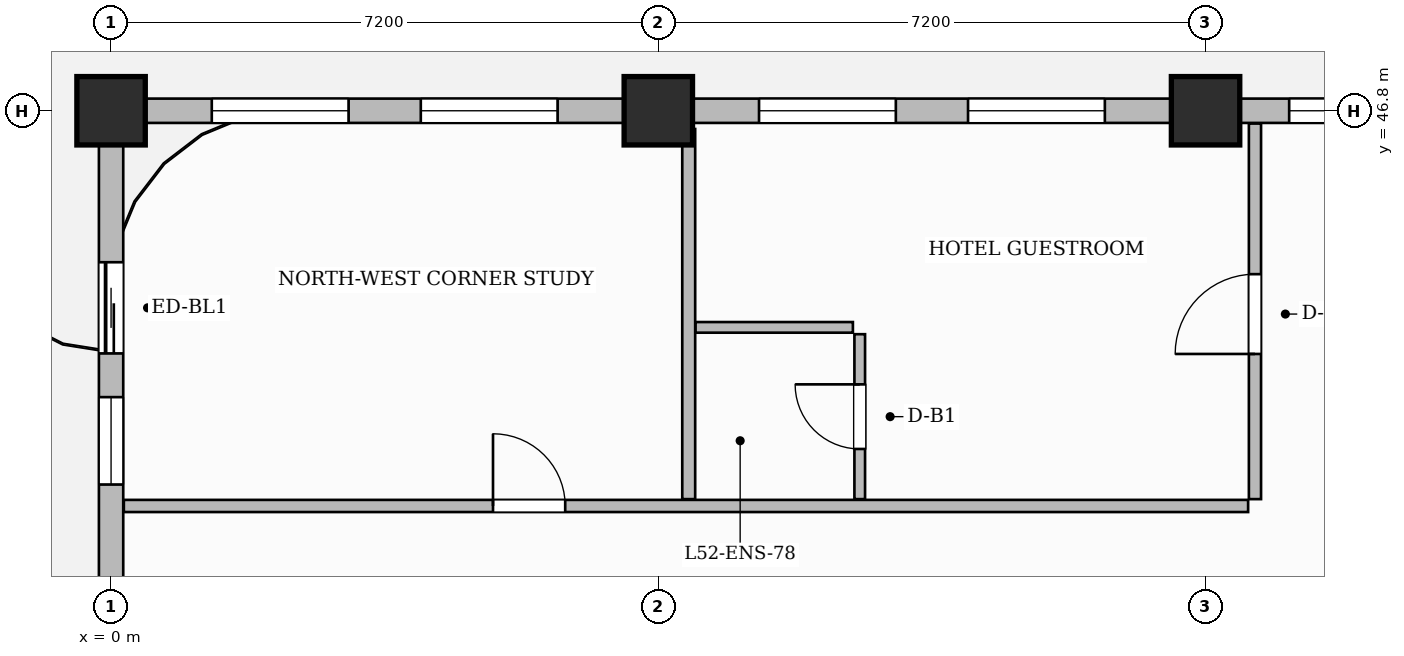
"""IFC4 building model, lengths in metres.
Left out: names, types, materials, properties, quantities, classifications, styles, units other than length and angle.
Written with IfcOpenShell. Run it as: python <this file> out.ifc"""

import sys

from ifc_helpers import new_model, si_unit, direction, frame, frame_2d, origin, origin_2d, place, context, subcontext, project, spatial, rectangle, extrude, source, transform, mapped, element, fill, save


model = new_model("IFC4")
c1 = context("Model", 3, precision=1e-05, world=origin(), true_north=direction((0.0, 1.0)))
c2 = subcontext(c1, "Body", "Model", "MODEL_VIEW")
j1 = project(units=[si_unit("LENGTHUNIT", "METRE"), si_unit("PLANEANGLEUNIT", "RADIAN")], contexts=[c1])
p1 = place(None, origin())
s1 = spatial("IfcSite", under=j1, at=p1, CompositionType="ELEMENT")
p2 = place(p1, origin())
s2 = spatial("IfcBuilding", under=s1, at=p2, CompositionType="ELEMENT")
p3 = place(p2, frame((0.0, 0.0, 209.6)))
s3 = spatial("IfcBuildingStorey", under=s2, at=p3, CompositionType="ELEMENT", Elevation=209.6)
m1 = source(origin(), c2, "Body", "SweptSolid", [
    extrude(rectangle(XDim=0.9, YDim=0.9, at=origin_2d()), origin(), (0.0, 0.0, 1.0), 3.85),
])
for number, where, z_axis, x_axis in (
    (1, (0.0, 46.8, 0.0), (0.0, 0.0, 1.0), (1.0, 0.0, 0.0)),
    (2, (7.2, 46.8, 0.0), (0.0, 0.0, 1.0), (1.0, 0.0, 0.0)),
    (3, (14.4, 46.8, 0.0), (0.0, 0.0, 1.0), (1.0, 0.0, 0.0)),
):
    element("IfcColumn", number, at=place(p3, frame(where, z_axis=z_axis, x_axis=x_axis)), inside=s3, PredefinedType="COLUMN", context=c2, shape_type="MappedRepresentation", body=[
        mapped(m1, transform((0.0, 0.0, 0.0), scale=1.0)),
    ])
p4 = place(p3, frame((15.05, 41.69, 0.0), z_axis=(0.0, 0.0, 1.0), x_axis=(0.0, 1.0, 0.0)))
e4 = element("IfcWall", 4, at=p4, inside=s3, PredefinedType="PARTITIONING", context=c2, shape_type="SweptSolid", body=[
    extrude(rectangle(XDim=4.942, YDim=0.16, at=frame_2d((2.471, 0.0))), origin(), (0.0, 0.0, 1.0), 3.6),
])
p5 = place(p4, frame((1.91, 0.0, 0.0)))
e5 = element("IfcOpeningElement", 5, at=p5, cuts=e4, PredefinedType="OPENING", context=c2, shape_type="SweptSolid", body=[
    extrude(rectangle(XDim=1.05, YDim=2.25, at=frame_2d((0.525, 1.125))), frame((0.0, 0.09, 0.0), z_axis=(0.0, -1.0, 0.0), x_axis=(1.0, 0.0, 0.0)), (0.0, 0.0, 1.0), 0.18),
])
p6 = place(p3, frame((7.6, 41.69, 0.0), z_axis=(0.0, 0.0, 1.0), x_axis=(0.0, 1.0, 0.0)))
e6 = element("IfcWall", 6, at=p6, inside=s3, PredefinedType="PARTITIONING", context=c2, shape_type="SweptSolid", body=[
    extrude(rectangle(XDim=4.87, YDim=0.17, at=frame_2d((2.435, 0.0))), origin(), (0.0, 0.0, 1.0), 3.6),
])
p7 = place(p3, frame((0.168, 41.6, 0.0), z_axis=(0.0, 0.0, 1.0), x_axis=(1.0, 0.0, 0.0)))
e7 = element("IfcWall", 7, at=p7, inside=s3, PredefinedType="PARTITIONING", context=c2, shape_type="SweptSolid", body=[
    extrude(rectangle(XDim=14.792, YDim=0.16, at=frame_2d((7.396, 0.0))), origin(), (0.0, 0.0, 1.0), 3.6),
])
p8 = place(p7, frame((4.857, 0.0, 0.0)))
e8 = element("IfcOpeningElement", 8, at=p8, cuts=e7, PredefinedType="OPENING", context=c2, shape_type="SweptSolid", body=[
    extrude(rectangle(XDim=0.95, YDim=2.15, at=frame_2d((0.475, 1.075))), frame((0.0, 0.09, 0.0), z_axis=(0.0, -1.0, 0.0), x_axis=(1.0, 0.0, 0.0)), (0.0, 0.0, 1.0), 0.18),
])
p9 = place(p3, frame((7.69, 43.95, 0.0), z_axis=(0.0, 0.0, 1.0), x_axis=(1.0, 0.0, 0.0)))
e9 = element("IfcWall", 9, at=p9, inside=s3, PredefinedType="PARTITIONING", context=c2, shape_type="SweptSolid", body=[
    extrude(rectangle(XDim=2.07, YDim=0.14, at=frame_2d((1.035, 0.0))), origin(), (0.0, 0.0, 1.0), 3.6),
])
p10 = place(p3, frame((9.85, 41.69, 0.0), z_axis=(0.0, 0.0, 1.0), x_axis=(0.0, 1.0, 0.0)))
e10 = element("IfcWall", 10, at=p10, inside=s3, PredefinedType="PARTITIONING", context=c2, shape_type="SweptSolid", body=[
    extrude(rectangle(XDim=2.17, YDim=0.14, at=frame_2d((1.085, 0.0))), origin(), (0.0, 0.0, 1.0), 3.6),
])
p11 = place(p10, frame((0.66, 0.0, 0.0)))
e11 = element("IfcOpeningElement", 11, at=p11, cuts=e10, PredefinedType="OPENING", context=c2, shape_type="SweptSolid", body=[
    extrude(rectangle(XDim=0.85, YDim=2.1, at=frame_2d((0.425, 1.05))), frame((0.0, 0.08, 0.0), z_axis=(0.0, -1.0, 0.0), x_axis=(1.0, 0.0, 0.0)), (0.0, 0.0, 1.0), 0.16),
])
p12 = place(p3, frame((0.0, 25.25, 0.0), z_axis=(0.0, 0.0, 1.0), x_axis=(0.0, 1.0, 0.0)))
e12 = element("IfcWall", 12, at=p12, inside=s3, PredefinedType="SOLIDWALL", context=c2, shape_type="SweptSolid", body=[
    extrude(rectangle(XDim=21.5, YDim=0.32, at=frame_2d((10.75, 0.0))), origin(), (0.0, 0.0, 1.0), 3.6),
])
p13 = place(p12, frame((18.357, 0.0, 0.0)))
e13 = element("IfcOpeningElement", 13, at=p13, cuts=e12, PredefinedType="OPENING", context=c2, shape_type="SweptSolid", body=[
    extrude(rectangle(XDim=1.2, YDim=2.2, at=frame_2d((0.6, 1.1))), frame((0.0, 0.17, 0.0), z_axis=(0.0, -1.0, 0.0), x_axis=(1.0, 0.0, 0.0)), (0.0, 0.0, 1.0), 0.34),
])
p14 = place(p12, frame((0.8, 0.0, 0.0)))
e14 = element("IfcOpeningElement", 14, at=p14, cuts=e12, PredefinedType="OPENING", context=c2, shape_type="SweptSolid", body=[
    extrude(rectangle(XDim=1.2, YDim=2.2, at=frame_2d((0.6, 1.1))), frame((0.0, 0.17, 0.0), z_axis=(0.0, -1.0, 0.0), x_axis=(1.0, 0.0, 0.0)), (0.0, 0.0, 1.0), 0.34),
])
p15 = place(p12, frame((3.425, 0.0, 0.8)))
e15 = element("IfcOpeningElement", 15, at=p15, cuts=e12, PredefinedType="OPENING", context=c2, shape_type="SweptSolid", body=[
    extrude(rectangle(XDim=1.8, YDim=1.85, at=frame_2d((0.9, 0.925))), frame((0.0, 0.17, 0.0), z_axis=(0.0, -1.0, 0.0), x_axis=(1.0, 0.0, 0.0)), (0.0, 0.0, 1.0), 0.34),
])
p16 = place(p12, frame((8.475, 0.0, 0.8)))
e16 = element("IfcOpeningElement", 16, at=p16, cuts=e12, PredefinedType="OPENING", context=c2, shape_type="SweptSolid", body=[
    extrude(rectangle(XDim=1.8, YDim=1.85, at=frame_2d((0.9, 0.925))), frame((0.0, 0.17, 0.0), z_axis=(0.0, -1.0, 0.0), x_axis=(1.0, 0.0, 0.0)), (0.0, 0.0, 1.0), 0.34),
])
p17 = place(p12, frame((11.225, 0.0, 0.8)))
e17 = element("IfcOpeningElement", 17, at=p17, cuts=e12, PredefinedType="OPENING", context=c2, shape_type="SweptSolid", body=[
    extrude(rectangle(XDim=1.8, YDim=1.85, at=frame_2d((0.9, 0.925))), frame((0.0, 0.17, 0.0), z_axis=(0.0, -1.0, 0.0), x_axis=(1.0, 0.0, 0.0)), (0.0, 0.0, 1.0), 0.34),
])
p18 = place(p12, frame((16.632, 0.0, 0.8)))
e18 = element("IfcOpeningElement", 18, at=p18, cuts=e12, PredefinedType="OPENING", context=c2, shape_type="SweptSolid", body=[
    extrude(rectangle(XDim=1.15, YDim=1.8, at=frame_2d((0.575, 0.9))), frame((0.0, 0.17, 0.0), z_axis=(0.0, -1.0, 0.0), x_axis=(1.0, 0.0, 0.0)), (0.0, 0.0, 1.0), 0.34),
])
p19 = place(p3, frame((0.0, 46.8, 0.0), z_axis=(0.0, 0.0, 1.0), x_axis=(1.0, 0.0, 0.0)))
e19 = element("IfcWall", 19, at=p19, inside=s3, PredefinedType="SOLIDWALL", context=c2, shape_type="SweptSolid", body=[
    extrude(rectangle(XDim=18.0, YDim=0.32, at=frame_2d((9.0, 0.0))), origin(), (0.0, 0.0, 1.0), 3.6),
])
p20 = place(p19, frame((1.325, 0.0, 0.8)))
e20 = element("IfcOpeningElement", 20, at=p20, cuts=e19, PredefinedType="OPENING", context=c2, shape_type="SweptSolid", body=[
    extrude(rectangle(XDim=1.8, YDim=1.85, at=frame_2d((0.9, 0.925))), frame((0.0, 0.17, 0.0), z_axis=(0.0, -1.0, 0.0), x_axis=(1.0, 0.0, 0.0)), (0.0, 0.0, 1.0), 0.34),
])
p21 = place(p19, frame((4.075, 0.0, 0.8)))
e21 = element("IfcOpeningElement", 21, at=p21, cuts=e19, PredefinedType="OPENING", context=c2, shape_type="SweptSolid", body=[
    extrude(rectangle(XDim=1.8, YDim=1.85, at=frame_2d((0.9, 0.925))), frame((0.0, 0.17, 0.0), z_axis=(0.0, -1.0, 0.0), x_axis=(1.0, 0.0, 0.0)), (0.0, 0.0, 1.0), 0.34),
])
p22 = place(p19, frame((8.525, 0.0, 0.8)))
e22 = element("IfcOpeningElement", 22, at=p22, cuts=e19, PredefinedType="OPENING", context=c2, shape_type="SweptSolid", body=[
    extrude(rectangle(XDim=1.8, YDim=1.85, at=frame_2d((0.9, 0.925))), frame((0.0, 0.17, 0.0), z_axis=(0.0, -1.0, 0.0), x_axis=(1.0, 0.0, 0.0)), (0.0, 0.0, 1.0), 0.34),
])
p23 = place(p19, frame((11.275, 0.0, 0.8)))
e23 = element("IfcOpeningElement", 23, at=p23, cuts=e19, PredefinedType="OPENING", context=c2, shape_type="SweptSolid", body=[
    extrude(rectangle(XDim=1.8, YDim=1.85, at=frame_2d((0.9, 0.925))), frame((0.0, 0.17, 0.0), z_axis=(0.0, -1.0, 0.0), x_axis=(1.0, 0.0, 0.0)), (0.0, 0.0, 1.0), 0.34),
])
p24 = place(p19, frame((15.5, 0.0, 0.8)))
e24 = element("IfcOpeningElement", 24, at=p24, cuts=e19, PredefinedType="OPENING", context=c2, shape_type="SweptSolid", body=[
    extrude(rectangle(XDim=1.4, YDim=1.85, at=frame_2d((0.7, 0.925))), frame((0.0, 0.17, 0.0), z_axis=(0.0, -1.0, 0.0), x_axis=(1.0, 0.0, 0.0)), (0.0, 0.0, 1.0), 0.34),
])
m2 = source(origin(), c2, "Body", "SweptSolid", [
    extrude(rectangle(XDim=0.95, YDim=2.15, at=frame_2d((0.475, 1.075))), frame((0.0, 0.025, 0.0), z_axis=(0.0, -1.0, 0.0), x_axis=(1.0, 0.0, 0.0)), (0.0, 0.0, 1.0), 0.05),
])
p25 = place(p8, origin())
e25 = element("IfcDoor", 25, at=p25, inside=s3, OperationType="SINGLE_SWING_LEFT", PredefinedType="DOOR", context=c2, shape_type="MappedRepresentation", body=[
    mapped(m2, transform((0.0, 0.0, 0.0), scale=1.0)),
])
fill(e8, e25)
m3 = source(origin(), c2, "Body", "SweptSolid", [
    extrude(rectangle(XDim=0.85, YDim=2.1, at=frame_2d((0.425, 1.05))), frame((0.0, 0.025, 0.0), z_axis=(0.0, -1.0, 0.0), x_axis=(1.0, 0.0, 0.0)), (0.0, 0.0, 1.0), 0.05),
])
p26 = place(p11, origin())
e26 = element("IfcDoor", 26, at=p26, inside=s3, OperationType="SINGLE_SWING_RIGHT", PredefinedType="DOOR", context=c2, shape_type="MappedRepresentation", body=[
    mapped(m3, transform((0.0, 0.0, 0.0), scale=1.0)),
])
fill(e11, e26)
m4 = source(origin(), c2, "Body", "SweptSolid", [
    extrude(rectangle(XDim=1.05, YDim=2.25, at=frame_2d((0.525, 1.125))), frame((0.0, 0.025, 0.0), z_axis=(0.0, -1.0, 0.0), x_axis=(1.0, 0.0, 0.0)), (0.0, 0.0, 1.0), 0.05),
])
p27 = place(p5, origin())
e27 = element("IfcDoor", 27, at=p27, inside=s3, OperationType="SINGLE_SWING_LEFT", PredefinedType="DOOR", context=c2, shape_type="MappedRepresentation", body=[
    mapped(m4, transform((0.0, 0.0, 0.0), scale=1.0)),
])
fill(e5, e27)
m5 = source(origin(), c2, "Body", "SweptSolid", [
    extrude(rectangle(XDim=1.2, YDim=2.2, at=frame_2d((0.6, 1.1))), frame((0.0, 0.025, 0.0), z_axis=(0.0, -1.0, 0.0), x_axis=(1.0, 0.0, 0.0)), (0.0, 0.0, 1.0), 0.05),
])
p28 = place(p13, origin())
e28 = element("IfcDoor", 28, at=p28, inside=s3, OperationType="SLIDING_TO_LEFT", PredefinedType="DOOR", context=c2, shape_type="MappedRepresentation", body=[
    mapped(m5, transform((0.0, 0.0, 0.0), scale=1.0)),
])
fill(e13, e28)
m6 = source(origin(), c2, "Body", "SweptSolid", [
    extrude(rectangle(XDim=1.15, YDim=1.8, at=frame_2d((0.575, 0.9))), frame((0.0, 0.03, 0.0), z_axis=(0.0, -1.0, 0.0), x_axis=(1.0, 0.0, 0.0)), (0.0, 0.0, 1.0), 0.06),
])
p29 = place(p18, origin())
e29 = element("IfcWindow", 29, at=p29, inside=s3, PartitioningType="SINGLE_PANEL", PredefinedType="WINDOW", context=c2, shape_type="MappedRepresentation", body=[
    mapped(m6, transform((0.0, 0.0, 0.0), scale=1.0)),
])
fill(e18, e29)
m7 = source(origin(), c2, "Body", "SweptSolid", [
    extrude(rectangle(XDim=1.8, YDim=1.85, at=frame_2d((0.9, 0.925))), frame((0.0, 0.03, 0.0), z_axis=(0.0, -1.0, 0.0), x_axis=(1.0, 0.0, 0.0)), (0.0, 0.0, 1.0), 0.06),
])
p30 = place(p20, origin())
e30 = element("IfcWindow", 30, at=p30, inside=s3, PartitioningType="DOUBLE_PANEL_VERTICAL", PredefinedType="WINDOW", context=c2, shape_type="MappedRepresentation", body=[
    mapped(m7, transform((0.0, 0.0, 0.0), scale=1.0)),
])
fill(e20, e30)
p31 = place(p21, origin())
e31 = element("IfcWindow", 31, at=p31, inside=s3, PartitioningType="DOUBLE_PANEL_VERTICAL", PredefinedType="WINDOW", context=c2, shape_type="MappedRepresentation", body=[
    mapped(m7, transform((0.0, 0.0, 0.0), scale=1.0)),
])
fill(e21, e31)
p32 = place(p22, origin())
e32 = element("IfcWindow", 32, at=p32, inside=s3, PartitioningType="DOUBLE_PANEL_VERTICAL", PredefinedType="WINDOW", context=c2, shape_type="MappedRepresentation", body=[
    mapped(m7, transform((0.0, 0.0, 0.0), scale=1.0)),
])
fill(e22, e32)
p33 = place(p23, origin())
e33 = element("IfcWindow", 33, at=p33, inside=s3, PartitioningType="DOUBLE_PANEL_VERTICAL", PredefinedType="WINDOW", context=c2, shape_type="MappedRepresentation", body=[
    mapped(m7, transform((0.0, 0.0, 0.0), scale=1.0)),
])
fill(e23, e33)
m8 = source(origin(), c2, "Body", "SweptSolid", [
    extrude(rectangle(XDim=1.4, YDim=1.85, at=frame_2d((0.7, 0.925))), frame((0.0, 0.03, 0.0), z_axis=(0.0, -1.0, 0.0), x_axis=(1.0, 0.0, 0.0)), (0.0, 0.0, 1.0), 0.06),
])
p34 = place(p24, origin())
e34 = element("IfcWindow", 34, at=p34, inside=s3, PartitioningType="SINGLE_PANEL", PredefinedType="WINDOW", context=c2, shape_type="MappedRepresentation", body=[
    mapped(m8, transform((0.0, 0.0, 0.0), scale=1.0)),
])
fill(e24, e34)
save(model, sys.argv[1])
